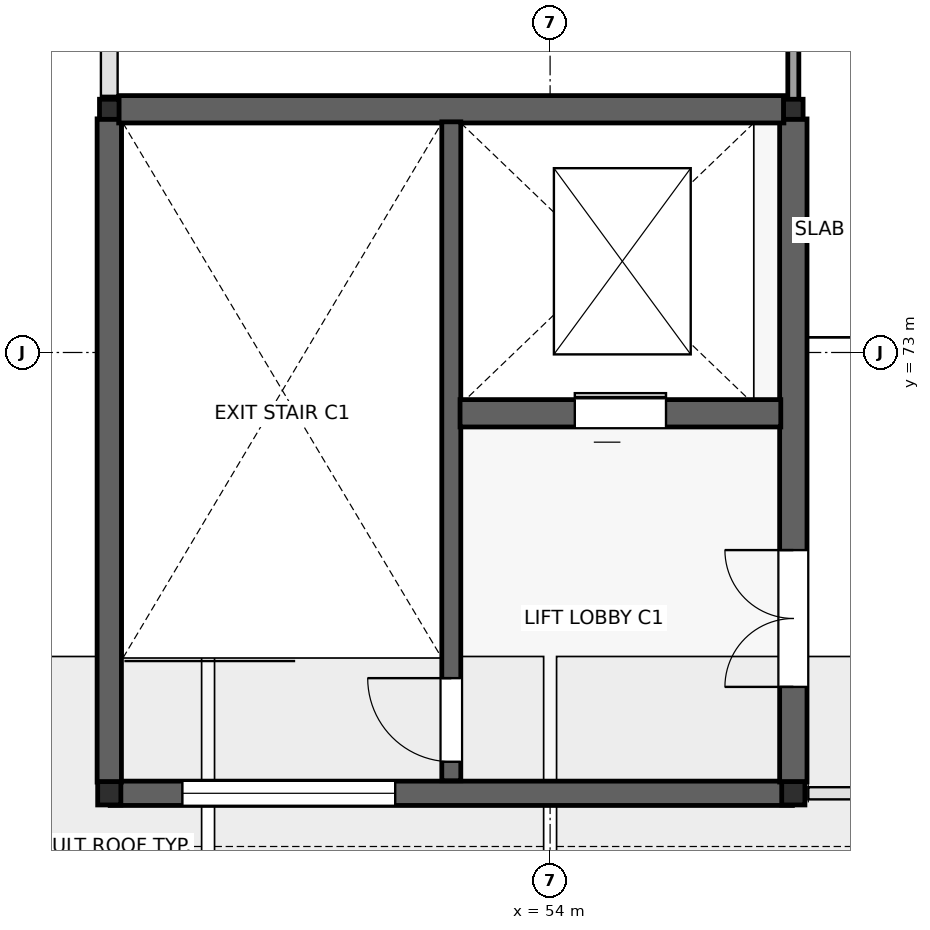
"""IFC4 building model, lengths in metres.
Left out: names, types, materials, properties, quantities, classifications, styles, units other than length and angle.
Written with IfcOpenShell. Run it as: python <this file> out.ifc"""

import sys

from ifc_helpers import new_model, si_unit, direction, frame, frame_2d, origin, origin_2d, place, context, subcontext, project, spatial, rectangle, i_section, extrude, element, fill, save


model = new_model("IFC4")
c1 = context("Model", 3, precision=1e-05, world=origin(), true_north=direction((0.0, 1.0)))
c2 = subcontext(c1, "Body", "Model", "MODEL_VIEW")
j1 = project(units=[si_unit("LENGTHUNIT", "METRE"), si_unit("PLANEANGLEUNIT", "RADIAN")], contexts=[c1])
p1 = place(None, origin())
s1 = spatial("IfcSite", under=j1, at=p1, CompositionType="ELEMENT")
p2 = place(p1, origin())
s2 = spatial("IfcBuilding", under=s1, at=p2, CompositionType="ELEMENT")
p3 = place(p2, frame((0.0, 0.0, 12.0)))
s3 = spatial("IfcBuildingStorey", under=s2, at=p3, CompositionType="ELEMENT", Elevation=12.0)
for number, where, z_axis, x_axis in (
    (1, (48.2, 67.2, 0.0), (0.0, 0.0, 1.0), (1.0, 0.0, 0.0)),
    (2, (57.2, 67.2, 0.0), (0.0, 0.0, 1.0), (1.0, 0.0, 0.0)),
):
    element("IfcColumn", number, at=place(p3, frame(where, z_axis=z_axis, x_axis=x_axis)), inside=s3, PredefinedType="COLUMN", context=c2, shape_type="SweptSolid", body=[
        extrude(i_section(OverallWidth=0.305, OverallDepth=0.307, WebThickness=0.01, FlangeThickness=0.015, at=origin_2d()), origin(), (0.0, 0.0, 1.0), 3.0),
    ])
for number, where, z_axis, x_axis in (
    (3, (48.2, 76.2, 0.0), (0.0, 0.0, 1.0), (1.0, 0.0, 0.0)),
    (4, (57.2, 76.2, 0.0), (0.0, 0.0, 1.0), (1.0, 0.0, 0.0)),
):
    element("IfcColumn", number, at=place(p3, frame(where, z_axis=z_axis, x_axis=x_axis)), inside=s3, PredefinedType="COLUMN", context=c2, shape_type="SweptSolid", body=[
        extrude(i_section(OverallWidth=0.257, OverallDepth=0.264, WebThickness=0.012, FlangeThickness=0.02, at=origin_2d()), origin(), (0.0, 0.0, 1.0), 3.0),
    ])
p4 = place(p3, frame((57.188, 67.2, 0.0), z_axis=(0.0, 0.0, 1.0), x_axis=(-1.0, 0.0, 0.0)))
e5 = element("IfcWall", 5, at=p4, inside=s3, PredefinedType="STANDARD", context=c2, shape_type="SweptSolid", body=[
    extrude(rectangle(XDim=8.976, YDim=0.32, at=frame_2d((4.488, 0.0))), origin(), (0.0, 0.0, 1.0), 3.0),
])
p5 = place(p4, frame((5.226, 0.0, 0.4)))
e6 = element("IfcOpeningElement", 6, at=p5, cuts=e5, PredefinedType="OPENING", context=c2, shape_type="SweptSolid", body=[
    extrude(rectangle(XDim=2.8, YDim=1.25, at=frame_2d((1.4, 0.625))), frame((0.0, 0.17, 0.0), z_axis=(0.0, -1.0, 0.0), x_axis=(1.0, 0.0, 0.0)), (0.0, 0.0, 1.0), 0.34),
])
p6 = place(p3, frame((48.2, 67.347, 0.0), z_axis=(0.0, 0.0, 1.0), x_axis=(0.0, 1.0, 0.0)))
e7 = element("IfcWall", 7, at=p6, inside=s3, PredefinedType="STANDARD", context=c2, shape_type="SweptSolid", body=[
    extrude(rectangle(XDim=8.727, YDim=0.32, at=frame_2d((4.364, 0.0))), origin(), (0.0, 0.0, 1.0), 3.0),
])
p7 = place(p3, frame((57.2, 67.348, 0.0), z_axis=(0.0, 0.0, 1.0), x_axis=(0.0, 1.0, 0.0)))
e8 = element("IfcWall", 8, at=p7, inside=s3, PredefinedType="SHEAR", context=c2, shape_type="SweptSolid", body=[
    extrude(rectangle(XDim=8.725, YDim=0.36, at=frame_2d((4.363, 0.0))), origin(), (0.0, 0.0, 1.0), 3.0),
])
p8 = place(p7, frame((1.252, 0.0, 0.0)))
e9 = element("IfcOpeningElement", 9, at=p8, cuts=e8, PredefinedType="OPENING", context=c2, shape_type="SweptSolid", body=[
    extrude(rectangle(XDim=1.8, YDim=2.3, at=frame_2d((0.9, 1.15))), frame((0.0, 0.19, 0.0), z_axis=(0.0, -1.0, 0.0), x_axis=(1.0, 0.0, 0.0)), (0.0, 0.0, 1.0), 0.38),
])
p9 = place(p3, frame((48.324, 76.2, 0.0), z_axis=(0.0, 0.0, 1.0), x_axis=(1.0, 0.0, 0.0)))
e10 = element("IfcWall", 10, at=p9, inside=s3, PredefinedType="SHEAR", context=c2, shape_type="SweptSolid", body=[
    extrude(rectangle(XDim=8.752, YDim=0.36, at=frame_2d((4.376, 0.0))), origin(), (0.0, 0.0, 1.0), 3.0),
])
p10 = place(p3, frame((52.7, 67.365, 0.0), z_axis=(0.0, 0.0, 1.0), x_axis=(0.0, 1.0, 0.0)))
e11 = element("IfcWall", 11, at=p10, inside=s3, PredefinedType="SHEAR", context=c2, shape_type="SweptSolid", body=[
    extrude(rectangle(XDim=8.67, YDim=0.25, at=frame_2d((4.335, 0.0))), origin(), (0.0, 0.0, 1.0), 3.0),
])
p11 = place(p10, frame((0.25, 0.0, 0.0)))
e12 = element("IfcOpeningElement", 12, at=p11, cuts=e11, PredefinedType="OPENING", context=c2, shape_type="SweptSolid", body=[
    extrude(rectangle(XDim=1.1, YDim=2.2, at=frame_2d((0.55, 1.1))), frame((0.0, 0.135, 0.0), z_axis=(0.0, -1.0, 0.0), x_axis=(1.0, 0.0, 0.0)), (0.0, 0.0, 1.0), 0.27),
])
p12 = place(p3, frame((52.815, 72.2, 0.0), z_axis=(0.0, 0.0, 1.0), x_axis=(1.0, 0.0, 0.0)))
e13 = element("IfcWall", 13, at=p12, inside=s3, PredefinedType="SHEAR", context=c2, shape_type="SweptSolid", body=[
    extrude(rectangle(XDim=4.22, YDim=0.36, at=frame_2d((2.11, 0.0))), origin(), (0.0, 0.0, 1.0), 3.0),
])
p13 = place(p12, frame((1.51, 0.0, 0.0)))
e14 = element("IfcOpeningElement", 14, at=p13, cuts=e13, PredefinedType="OPENING", context=c2, shape_type="SweptSolid", body=[
    extrude(rectangle(XDim=1.2, YDim=2.3, at=frame_2d((0.6, 1.15))), frame((0.0, 0.19, 0.0), z_axis=(0.0, -1.0, 0.0), x_axis=(1.0, 0.0, 0.0)), (0.0, 0.0, 1.0), 0.38),
])
p14 = place(p3, frame((57.2, 76.327, 0.0), z_axis=(0.0, 0.0, 1.0), x_axis=(0.0, 1.0, 0.0)))
e15 = element("IfcWall", 15, at=p14, inside=s3, PredefinedType="PARTITIONING", context=c2, shape_type="SweptSolid", body=[
    extrude(rectangle(XDim=8.546, YDim=0.145, at=frame_2d((4.273, 0.0))), origin(), (0.0, 0.0, 1.0), 2.95),
])
p15 = place(p5, origin())
e16 = element("IfcWindow", 16, at=p15, inside=s3, PartitioningType="SINGLE_PANEL", PredefinedType="WINDOW", context=c2, shape_type="SweptSolid", body=[
    extrude(rectangle(XDim=2.8, YDim=1.25, at=frame_2d((1.4, 0.625))), frame((0.0, 0.03, 0.0), z_axis=(0.0, -1.0, 0.0), x_axis=(1.0, 0.0, 0.0)), (0.0, 0.0, 1.0), 0.06),
])
fill(e6, e16)
p16 = place(p11, origin())
e17 = element("IfcDoor", 17, at=p16, inside=s3, OperationType="SINGLE_SWING_RIGHT", PredefinedType="DOOR", context=c2, shape_type="SweptSolid", body=[
    extrude(rectangle(XDim=1.1, YDim=2.2, at=frame_2d((0.55, 1.1))), frame((0.0, 0.025, 0.0), z_axis=(0.0, -1.0, 0.0), x_axis=(1.0, 0.0, 0.0)), (0.0, 0.0, 1.0), 0.05),
])
fill(e12, e17)
p17 = place(p13, origin())
e18 = element("IfcDoor", 18, at=p17, inside=s3, OperationType="SLIDING_TO_LEFT", PredefinedType="DOOR", context=c2, shape_type="SweptSolid", body=[
    extrude(rectangle(XDim=1.2, YDim=2.3, at=frame_2d((0.6, 1.15))), frame((0.0, 0.025, 0.0), z_axis=(0.0, -1.0, 0.0), x_axis=(1.0, 0.0, 0.0)), (0.0, 0.0, 1.0), 0.05),
])
fill(e14, e18)
p18 = place(p8, origin())
e19 = element("IfcDoor", 19, at=p18, inside=s3, OperationType="DOUBLE_DOOR_SINGLE_SWING", PredefinedType="DOOR", context=c2, shape_type="SweptSolid", body=[
    extrude(rectangle(XDim=1.8, YDim=2.3, at=frame_2d((0.9, 1.15))), frame((0.0, 0.025, 0.0), z_axis=(0.0, -1.0, 0.0), x_axis=(1.0, 0.0, 0.0)), (0.0, 0.0, 1.0), 0.05),
])
fill(e9, e19)
save(model, sys.argv[1])
